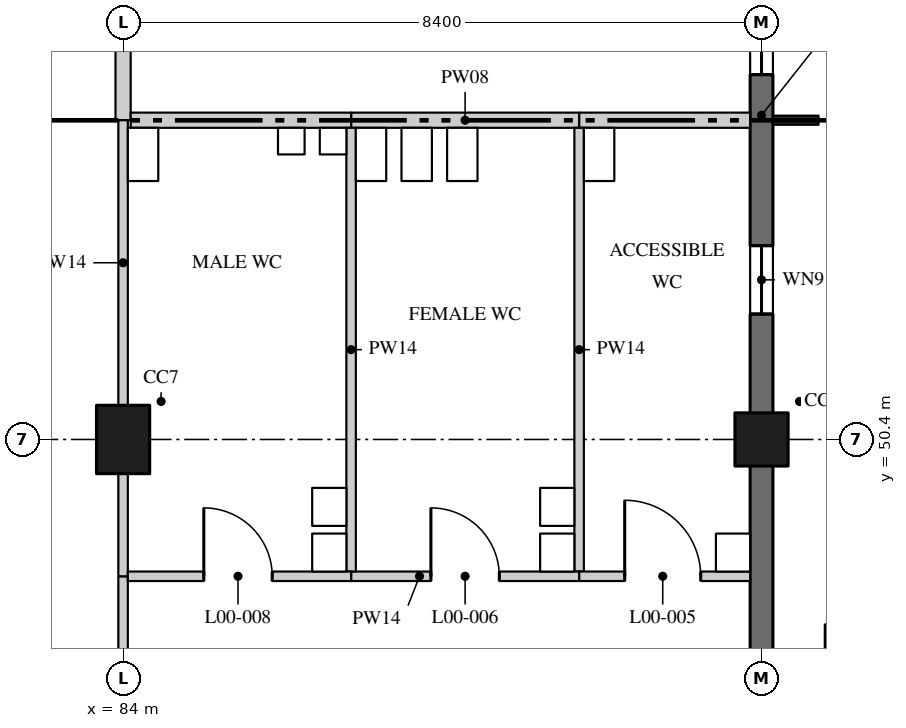
"""IFC4 building model, lengths in metres.
Left out: names, types, materials, properties, quantities, classifications, styles, units other than length and angle.
Written with IfcOpenShell. Run it as: python <this file> out.ifc"""

import sys

from ifc_helpers import new_model, si_unit, direction, frame, frame_2d, origin, origin_2d, place, context, subcontext, project, spatial, rectangle, hollow_circle, extrude, element, fill, save


model = new_model("IFC4")
c1 = context("Model", 3, precision=1e-05, world=origin(), true_north=direction((0.0, 1.0)))
c2 = subcontext(c1, "Body", "Model", "MODEL_VIEW")
j1 = project(units=[si_unit("LENGTHUNIT", "METRE"), si_unit("PLANEANGLEUNIT", "RADIAN")], contexts=[c1])
p1 = place(None, origin())
s1 = spatial("IfcSite", under=j1, at=p1, CompositionType="ELEMENT")
p2 = place(p1, origin())
s2 = spatial("IfcBuilding", under=s1, at=p2, CompositionType="ELEMENT")
p3 = place(p2, origin())
s3 = spatial("IfcBuildingStorey", under=s2, at=p3, CompositionType="ELEMENT", Elevation=0.0)
p4 = place(p3, frame((84.0, 50.4, 0.0), z_axis=(0.0, 0.0, 1.0), x_axis=(1.0, 0.0, 0.0)))
e1 = element("IfcColumn", 1, at=p4, inside=s3, PredefinedType="COLUMN", context=c2, shape_type="SweptSolid", body=[
    extrude(rectangle(XDim=0.7, YDim=0.9, at=origin_2d()), origin(), (0.0, 0.0, 1.0), 5.05),
])
p5 = place(p3, frame((92.4, 50.4, 0.0), z_axis=(0.0, 0.0, 1.0), x_axis=(1.0, 0.0, 0.0)))
e2 = element("IfcColumn", 2, at=p5, inside=s3, PredefinedType="COLUMN", context=c2, shape_type="SweptSolid", body=[
    extrude(rectangle(XDim=0.7, YDim=0.7, at=origin_2d()), origin(), (0.0, 0.0, 1.0), 5.05),
])
p6 = place(p3, frame((93.4, 47.8, 0.0), z_axis=(0.0, 0.0, 1.0), x_axis=(1.0, 0.0, 0.0)))
e3 = element("IfcColumn", 3, at=p6, inside=s3, PredefinedType="COLUMN", context=c2, shape_type="SweptSolid", body=[
    extrude(hollow_circle(Radius=0.162, WallThickness=0.013, at=origin_2d()), origin(), (0.0, 0.0, 1.0), 4.495),
])
p7 = place(p3, frame((84.0, 54.6, 0.0), z_axis=(0.0, 0.0, 1.0), x_axis=(0.0, 1.0, 0.0)))
e4 = element("IfcWall", 4, at=p7, inside=s3, PredefinedType="PARTITIONING", context=c2, shape_type="SweptSolid", body=[
    extrude(rectangle(XDim=4.0, YDim=0.2, at=frame_2d((2.0, 0.0))), origin(), (0.0, 0.0, 1.0), 18.77),
])
p8 = place(p7, frame((1.5, 0.0, 0.0)))
e5 = element("IfcOpeningElement", 5, at=p8, cuts=e4, PredefinedType="OPENING", context=c2, shape_type="SweptSolid", body=[
    extrude(rectangle(XDim=1.0, YDim=2.4, at=frame_2d((0.5, 1.2))), frame((0.0, 0.11, 0.0), z_axis=(0.0, -1.0, 0.0), x_axis=(1.0, 0.0, 0.0)), (0.0, 0.0, 1.0), 0.22),
])
p9 = place(p3, frame((90.0, 54.6, 0.0), z_axis=(0.0, 0.0, 1.0), x_axis=(1.0, 0.0, 0.0)))
e6 = element("IfcWall", 6, at=p9, inside=s3, PredefinedType="PARTITIONING", context=c2, shape_type="SweptSolid", body=[
    extrude(rectangle(XDim=2.25, YDim=0.2, at=frame_2d((1.125, 0.0))), origin(), (0.0, 0.0, 1.0), 5.05),
])
p10 = place(p3, frame((87.0, 54.6, 0.0), z_axis=(0.0, 0.0, 1.0), x_axis=(1.0, 0.0, 0.0)))
e7 = element("IfcWall", 7, at=p10, inside=s3, PredefinedType="PARTITIONING", context=c2, shape_type="SweptSolid", body=[
    extrude(rectangle(XDim=3.0, YDim=0.2, at=frame_2d((1.5, 0.0))), origin(), (0.0, 0.0, 1.0), 5.05),
])
p11 = place(p3, frame((84.1, 54.6, 0.0), z_axis=(0.0, 0.0, 1.0), x_axis=(1.0, 0.0, 0.0)))
e8 = element("IfcWall", 8, at=p11, inside=s3, PredefinedType="PARTITIONING", context=c2, shape_type="SweptSolid", body=[
    extrude(rectangle(XDim=2.9, YDim=0.2, at=frame_2d((1.45, 0.0))), origin(), (0.0, 0.0, 1.0), 5.05),
])
p12 = place(p3, frame((84.0, 46.2, 0.0), z_axis=(0.0, 0.0, 1.0), x_axis=(0.0, 1.0, 0.0)))
e9 = element("IfcWall", 9, at=p12, inside=s3, PredefinedType="PARTITIONING", context=c2, shape_type="SweptSolid", body=[
    extrude(rectangle(XDim=2.4, YDim=0.125, at=frame_2d((1.2, 0.0))), origin(), (0.0, 0.0, 1.0), 18.77),
])
p13 = place(p3, frame((84.0, 48.6, 0.0), z_axis=(0.0, 0.0, 1.0), x_axis=(0.0, 1.0, 0.0)))
e10 = element("IfcWall", 10, at=p13, inside=s3, PredefinedType="PARTITIONING", context=c2, shape_type="SweptSolid", body=[
    extrude(rectangle(XDim=1.35, YDim=0.125, at=frame_2d((0.675, 0.0))), origin(), (0.0, 0.0, 1.0), 18.77),
])
p14 = place(p3, frame((84.0, 50.85, 0.0), z_axis=(0.0, 0.0, 1.0), x_axis=(0.0, 1.0, 0.0)))
e11 = element("IfcWall", 11, at=p14, inside=s3, PredefinedType="PARTITIONING", context=c2, shape_type="SweptSolid", body=[
    extrude(rectangle(XDim=3.75, YDim=0.125, at=frame_2d((1.875, 0.0))), origin(), (0.0, 0.0, 1.0), 18.77),
])
p15 = place(p3, frame((90.0, 48.663, 0.0), z_axis=(0.0, 0.0, 1.0), x_axis=(0.0, 1.0, 0.0)))
e12 = element("IfcWall", 12, at=p15, inside=s3, PredefinedType="PARTITIONING", context=c2, shape_type="SweptSolid", body=[
    extrude(rectangle(XDim=5.837, YDim=0.125, at=frame_2d((2.918, 0.0))), origin(), (0.0, 0.0, 1.0), 5.05),
])
p16 = place(p3, frame((90.0, 48.6, 0.0), z_axis=(0.0, 0.0, 1.0), x_axis=(1.0, 0.0, 0.0)))
e13 = element("IfcWall", 13, at=p16, inside=s3, PredefinedType="PARTITIONING", context=c2, shape_type="SweptSolid", body=[
    extrude(rectangle(XDim=2.25, YDim=0.125, at=frame_2d((1.125, 0.0))), origin(), (0.0, 0.0, 1.0), 5.05),
])
p17 = place(p16, frame((0.6, 0.0, 0.0)))
e14 = element("IfcOpeningElement", 14, at=p17, cuts=e13, PredefinedType="OPENING", context=c2, shape_type="SweptSolid", body=[
    extrude(rectangle(XDim=1.0, YDim=2.1, at=frame_2d((0.5, 1.05))), frame((0.0, 0.073, 0.0), z_axis=(0.0, -1.0, 0.0), x_axis=(1.0, 0.0, 0.0)), (0.0, 0.0, 1.0), 0.145),
])
p18 = place(p3, frame((87.0, 48.6, 0.0), z_axis=(0.0, 0.0, 1.0), x_axis=(1.0, 0.0, 0.0)))
e15 = element("IfcWall", 15, at=p18, inside=s3, PredefinedType="PARTITIONING", context=c2, shape_type="SweptSolid", body=[
    extrude(rectangle(XDim=3.0, YDim=0.125, at=frame_2d((1.5, 0.0))), origin(), (0.0, 0.0, 1.0), 5.05),
])
p19 = place(p18, frame((1.05, 0.0, 0.0)))
e16 = element("IfcOpeningElement", 16, at=p19, cuts=e15, PredefinedType="OPENING", context=c2, shape_type="SweptSolid", body=[
    extrude(rectangle(XDim=0.9, YDim=2.1, at=frame_2d((0.45, 1.05))), frame((0.0, 0.073, 0.0), z_axis=(0.0, -1.0, 0.0), x_axis=(1.0, 0.0, 0.0)), (0.0, 0.0, 1.0), 0.145),
])
p20 = place(p3, frame((87.0, 48.663, 0.0), z_axis=(0.0, 0.0, 1.0), x_axis=(0.0, 1.0, 0.0)))
e17 = element("IfcWall", 17, at=p20, inside=s3, PredefinedType="PARTITIONING", context=c2, shape_type="SweptSolid", body=[
    extrude(rectangle(XDim=5.837, YDim=0.125, at=frame_2d((2.918, 0.0))), origin(), (0.0, 0.0, 1.0), 5.05),
])
p21 = place(p3, frame((84.062, 48.6, 0.0), z_axis=(0.0, 0.0, 1.0), x_axis=(1.0, 0.0, 0.0)))
e18 = element("IfcWall", 18, at=p21, inside=s3, PredefinedType="PARTITIONING", context=c2, shape_type="SweptSolid", body=[
    extrude(rectangle(XDim=2.938, YDim=0.125, at=frame_2d((1.469, 0.0))), origin(), (0.0, 0.0, 1.0), 5.05),
])
p22 = place(p21, frame((1.0, 0.0, 0.0)))
e19 = element("IfcOpeningElement", 19, at=p22, cuts=e18, PredefinedType="OPENING", context=c2, shape_type="SweptSolid", body=[
    extrude(rectangle(XDim=0.9, YDim=2.1, at=frame_2d((0.45, 1.05))), frame((0.0, 0.073, 0.0), z_axis=(0.0, -1.0, 0.0), x_axis=(1.0, 0.0, 0.0)), (0.0, 0.0, 1.0), 0.145),
])
p23 = place(p3, frame((92.4, 42.2, 0.0), z_axis=(0.0, 0.0, 1.0), x_axis=(0.0, 1.0, 0.0)))
e20 = element("IfcWall", 20, at=p23, inside=s3, PredefinedType="SOLIDWALL", context=c2, shape_type="SweptSolid", body=[
    extrude(rectangle(XDim=7.87, YDim=0.3, at=frame_2d((3.935, 0.0))), origin(), (0.0, 0.0, 1.0), 5.05),
])
p24 = place(p23, frame((0.7, 0.0, 2.25)))
e21 = element("IfcOpeningElement", 21, at=p24, cuts=e20, PredefinedType="OPENING", context=c2, shape_type="SweptSolid", body=[
    extrude(rectangle(XDim=2.4, YDim=1.8, at=frame_2d((1.2, 0.9))), frame((0.0, 0.16, 0.0), z_axis=(0.0, -1.0, 0.0), x_axis=(1.0, 0.0, 0.0)), (0.0, 0.0, 1.0), 0.32),
])
p25 = place(p3, frame((92.4, 50.73, 0.0), z_axis=(0.0, 0.0, 1.0), x_axis=(0.0, 1.0, 0.0)))
e22 = element("IfcWall", 22, at=p25, inside=s3, PredefinedType="SOLIDWALL", context=c2, shape_type="SweptSolid", body=[
    extrude(rectangle(XDim=7.87, YDim=0.3, at=frame_2d((3.935, 0.0))), origin(), (0.0, 0.0, 1.0), 5.05),
])
p26 = place(p25, frame((1.32, 0.0, 1.5)))
e23 = element("IfcOpeningElement", 23, at=p26, cuts=e22, PredefinedType="OPENING", context=c2, shape_type="SweptSolid", body=[
    extrude(rectangle(XDim=0.9, YDim=1.2, at=frame_2d((0.45, 0.6))), frame((0.0, 0.16, 0.0), z_axis=(0.0, -1.0, 0.0), x_axis=(1.0, 0.0, 0.0)), (0.0, 0.0, 1.0), 0.32),
])
p27 = place(p25, frame((4.47, 0.0, 2.85)))
e24 = element("IfcOpeningElement", 24, at=p27, cuts=e22, PredefinedType="OPENING", context=c2, shape_type="SweptSolid", body=[
    extrude(rectangle(XDim=3.0, YDim=1.2, at=frame_2d((1.5, 0.6))), frame((0.0, 0.16, 0.0), z_axis=(0.0, -1.0, 0.0), x_axis=(1.0, 0.0, 0.0)), (0.0, 0.0, 1.0), 0.32),
])
p28 = place(p17, origin())
e25 = element("IfcDoor", 25, at=p28, inside=s3, OperationType="SINGLE_SWING_RIGHT", PredefinedType="DOOR", context=c2, shape_type="SweptSolid", body=[
    extrude(rectangle(XDim=1.0, YDim=2.1, at=frame_2d((0.5, 1.05))), frame((0.0, 0.02, 0.0), z_axis=(0.0, -1.0, 0.0), x_axis=(1.0, 0.0, 0.0)), (0.0, 0.0, 1.0), 0.04),
])
fill(e14, e25)
p29 = place(p19, origin())
e26 = element("IfcDoor", 26, at=p29, inside=s3, OperationType="SINGLE_SWING_RIGHT", PredefinedType="DOOR", context=c2, shape_type="SweptSolid", body=[
    extrude(rectangle(XDim=0.9, YDim=2.1, at=frame_2d((0.45, 1.05))), frame((0.0, 0.02, 0.0), z_axis=(0.0, -1.0, 0.0), x_axis=(1.0, 0.0, 0.0)), (0.0, 0.0, 1.0), 0.04),
])
fill(e16, e26)
p30 = place(p22, origin())
e27 = element("IfcDoor", 27, at=p30, inside=s3, OperationType="SINGLE_SWING_RIGHT", PredefinedType="DOOR", context=c2, shape_type="SweptSolid", body=[
    extrude(rectangle(XDim=0.9, YDim=2.1, at=frame_2d((0.45, 1.05))), frame((0.0, 0.02, 0.0), z_axis=(0.0, -1.0, 0.0), x_axis=(1.0, 0.0, 0.0)), (0.0, 0.0, 1.0), 0.04),
])
fill(e19, e27)
p31 = place(p26, origin())
e28 = element("IfcWindow", 28, at=p31, inside=s3, PartitioningType="SINGLE_PANEL", PredefinedType="WINDOW", context=c2, shape_type="SweptSolid", body=[
    extrude(rectangle(XDim=0.9, YDim=1.2, at=frame_2d((0.45, 0.6))), frame((0.0, 0.05, 0.0), z_axis=(0.0, -1.0, 0.0), x_axis=(1.0, 0.0, 0.0)), (0.0, 0.0, 1.0), 0.1),
])
fill(e23, e28)
p32 = place(p27, origin())
e29 = element("IfcWindow", 29, at=p32, inside=s3, PartitioningType="SINGLE_PANEL", PredefinedType="WINDOW", context=c2, shape_type="SweptSolid", body=[
    extrude(rectangle(XDim=3.0, YDim=1.2, at=frame_2d((1.5, 0.6))), frame((0.0, 0.05, 0.0), z_axis=(0.0, -1.0, 0.0), x_axis=(1.0, 0.0, 0.0)), (0.0, 0.0, 1.0), 0.1),
])
fill(e24, e29)
save(model, sys.argv[1])
